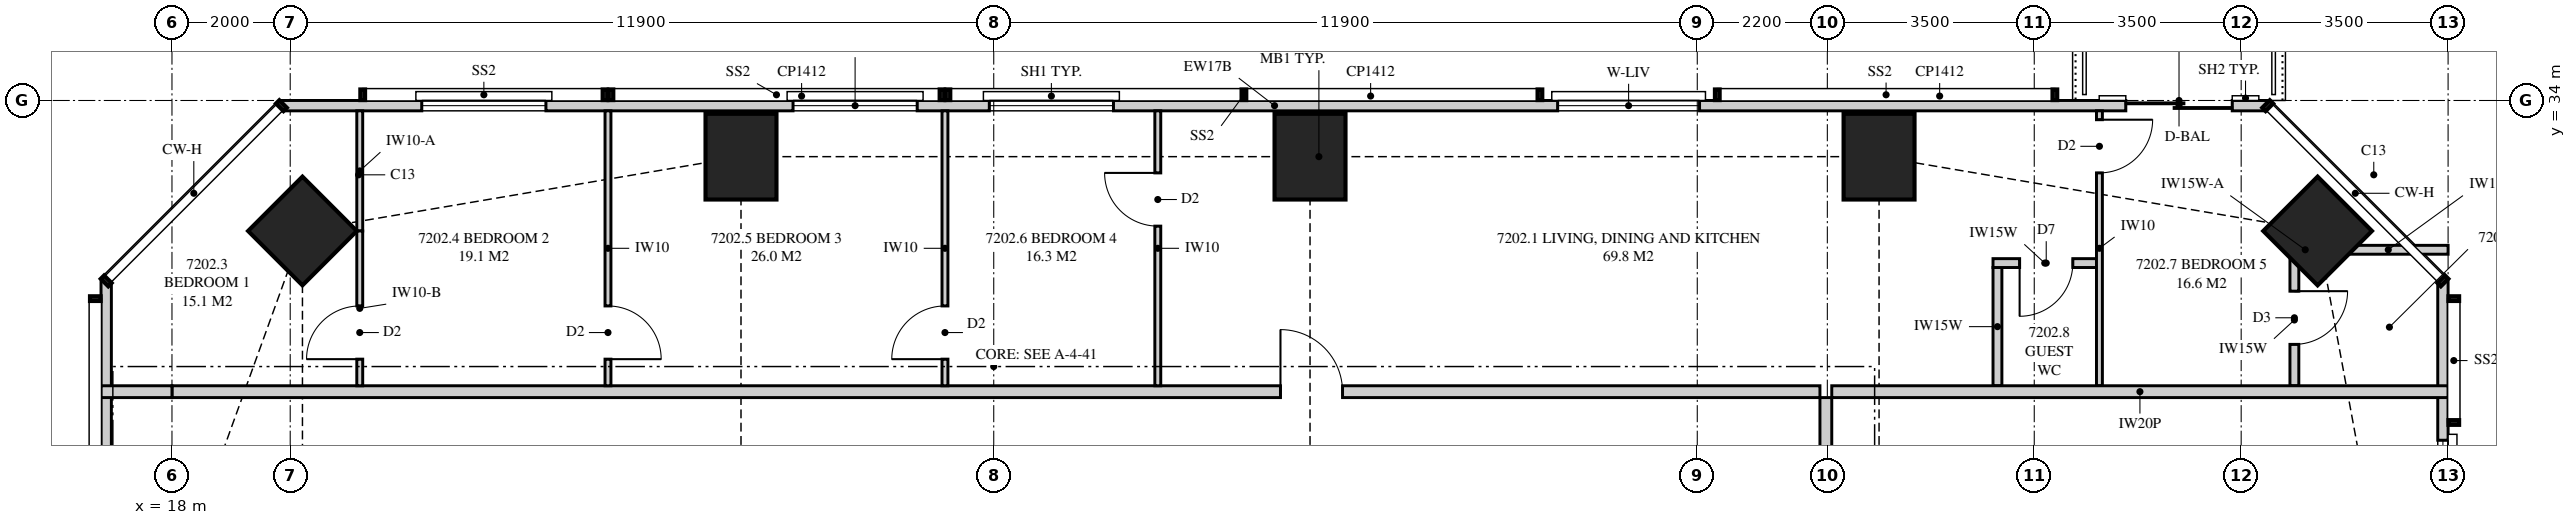
"""IFC4 building model, lengths in metres.
Left out: names, types, materials, properties, quantities, classifications, styles, units other than length and angle.
Written with IfcOpenShell. Run it as: python <this file> out.ifc"""

import sys

from ifc_helpers import new_model, si_unit, direction, frame, frame_2d, origin, origin_2d, place, context, subcontext, project, spatial, polyline, rectangle, outline, extrude, element, fill, save


model = new_model("IFC4")
c1 = context("Model", 3, precision=1e-05, world=origin(), true_north=direction((0.0, 1.0)))
c2 = subcontext(c1, "Body", "Model", "MODEL_VIEW")
j1 = project(units=[si_unit("LENGTHUNIT", "METRE"), si_unit("PLANEANGLEUNIT", "RADIAN")], contexts=[c1])
p1 = place(None, origin())
s1 = spatial("IfcSite", under=j1, at=p1, CompositionType="ELEMENT")
p2 = place(p1, origin())
s2 = spatial("IfcBuilding", under=s1, at=p2, CompositionType="ELEMENT")
p3 = place(p2, frame((0.0, 0.0, 263.85)))
s3 = spatial("IfcBuildingStorey", under=s2, at=p3, CompositionType="ELEMENT", Elevation=263.85)
p4 = place(p3, frame((54.293, 31.793, 0.0), z_axis=(0.0, 0.0, 1.0), x_axis=(0.707106781187, 0.707106781187, 0.0)))
e1 = element("IfcColumn", 1, at=p4, inside=s3, PredefinedType="COLUMN", context=c2, shape_type="SweptSolid", body=[
    extrude(rectangle(XDim=1.3, YDim=1.3, at=origin_2d()), origin(), (0.0, 0.0, 1.0), 3.9),
])
for number, where, z_axis, x_axis in (
    (2, (46.875, 33.05, 0.0), (0.0, 0.0, 1.0), (0.0, 1.0, 0.0)),
    (3, (37.25, 33.05, 0.0), (0.0, 0.0, 1.0), (0.0, 1.0, 0.0)),
    (4, (27.625, 33.05, 0.0), (0.0, 0.0, 1.0), (0.0, 1.0, 0.0)),
):
    element("IfcColumn", number, at=place(p3, frame(where, z_axis=z_axis, x_axis=x_axis)), inside=s3, PredefinedType="COLUMN", context=c2, shape_type="SweptSolid", body=[
        extrude(rectangle(XDim=1.45, YDim=1.2, at=origin_2d()), origin(), (0.0, 0.0, 1.0), 3.9),
    ])
p5 = place(p3, frame((20.207, 31.793, 0.0), z_axis=(0.0, 0.0, 1.0), x_axis=(0.707106781187, 0.707106781187, 0.0)))
e5 = element("IfcColumn", 5, at=p5, inside=s3, PredefinedType="COLUMN", context=c2, shape_type="SweptSolid", body=[
    extrude(rectangle(XDim=1.3, YDim=1.3, at=origin_2d()), origin(), (0.0, 0.0, 1.0), 3.9),
])
p6 = place(p3, frame((56.413, 24.125, 0.0), z_axis=(0.0, 0.0, 1.0), x_axis=(0.0, 1.0, 0.0)))
e6 = element("IfcWall", 6, at=p6, inside=s3, PredefinedType="SOLIDWALL", context=c2, shape_type="SweptSolid", body=[
    extrude(outline(polyline([(0.0, 0.0), (6.824, 0.0), (6.824, 3.62), (1.083, 3.62), (1.083, 2.7), (1.018, 2.7), (1.018, 3.62), (0.875, 3.62), (0.875, 2.7), (0.0, 2.7), (0.0, 0.0)])), frame((0.0, 0.087, 0.0), z_axis=(0.0, -1.0, 0.0), x_axis=(1.0, 0.0, 0.0)), (0.0, 0.0, 1.0), 0.175),
])
p7 = place(p6, frame((1.729, 0.0, 0.4)))
e7 = element("IfcOpeningElement", 7, at=p7, cuts=e6, PredefinedType="OPENING", context=c2, shape_type="SweptSolid", body=[
    extrude(rectangle(XDim=2.4, YDim=2.0, at=frame_2d((1.2, 1.0))), frame((0.0, 0.097, 0.0), z_axis=(0.0, -1.0, 0.0), x_axis=(1.0, 0.0, 0.0)), (0.0, 0.0, 1.0), 0.195),
])
p8 = place(p3, frame((53.449, 33.913, 0.0), z_axis=(0.0, 0.0, 1.0), x_axis=(-1.0, 0.0, 0.0)))
e8 = element("IfcWall", 8, at=p8, inside=s3, PredefinedType="SOLIDWALL", context=c2, shape_type="SweptSolid", body=[
    extrude(outline(polyline([(0.0, 0.0), (33.597, 0.0), (33.597, 3.62), (26.039, 3.62), (26.039, 2.7), (25.955, 2.7), (25.955, 3.62), (25.824, 3.62), (25.824, 2.7), (6.574, 2.7), (6.574, 3.62), (6.442, 3.62), (6.442, 2.7), (6.359, 2.7), (6.359, 3.62), (0.0, 3.62), (0.0, 0.0)])), frame((0.0, 0.087, 0.0), z_axis=(0.0, -1.0, 0.0), x_axis=(1.0, 0.0, 0.0)), (0.0, 0.0, 1.0), 0.175),
])
p9 = place(p8, frame((0.6, 0.0, 0.0)))
e9 = element("IfcOpeningElement", 9, at=p9, cuts=e8, PredefinedType="OPENING", context=c2, shape_type="SweptSolid", body=[
    extrude(rectangle(XDim=1.8, YDim=2.4, at=frame_2d((0.9, 1.2))), frame((0.0, 0.097, 0.0), z_axis=(0.0, -1.0, 0.0), x_axis=(1.0, 0.0, 0.0)), (0.0, 0.0, 1.0), 0.195),
])
p10 = place(p8, frame((9.61, 0.0, 0.4)))
e10 = element("IfcOpeningElement", 10, at=p10, cuts=e8, PredefinedType="OPENING", context=c2, shape_type="SweptSolid", body=[
    extrude(rectangle(XDim=2.4, YDim=2.0, at=frame_2d((1.2, 1.0))), frame((0.0, 0.097, 0.0), z_axis=(0.0, -1.0, 0.0), x_axis=(1.0, 0.0, 0.0)), (0.0, 0.0, 1.0), 0.195),
])
p11 = place(p8, frame((19.524, 0.0, 0.4)))
e11 = element("IfcOpeningElement", 11, at=p11, cuts=e8, PredefinedType="OPENING", context=c2, shape_type="SweptSolid", body=[
    extrude(rectangle(XDim=2.1, YDim=2.25, at=frame_2d((1.05, 1.125))), frame((0.0, 0.097, 0.0), z_axis=(0.0, -1.0, 0.0), x_axis=(1.0, 0.0, 0.0)), (0.0, 0.0, 1.0), 0.195),
])
p12 = place(p8, frame((22.844, 0.0, 0.4)))
e12 = element("IfcOpeningElement", 12, at=p12, cuts=e8, PredefinedType="OPENING", context=c2, shape_type="SweptSolid", body=[
    extrude(rectangle(XDim=2.1, YDim=2.25, at=frame_2d((1.05, 1.125))), frame((0.0, 0.097, 0.0), z_axis=(0.0, -1.0, 0.0), x_axis=(1.0, 0.0, 0.0)), (0.0, 0.0, 1.0), 0.195),
])
p13 = place(p8, frame((29.123, 0.0, 0.4)))
e13 = element("IfcOpeningElement", 13, at=p13, cuts=e8, PredefinedType="OPENING", context=c2, shape_type="SweptSolid", body=[
    extrude(rectangle(XDim=2.1, YDim=2.25, at=frame_2d((1.05, 1.125))), frame((0.0, 0.097, 0.0), z_axis=(0.0, -1.0, 0.0), x_axis=(1.0, 0.0, 0.0)), (0.0, 0.0, 1.0), 0.195),
])
p14 = place(p3, frame((16.887, 30.949, 0.0), z_axis=(0.0, 0.0, 1.0), x_axis=(0.0, -1.0, 0.0)))
e14 = element("IfcWall", 14, at=p14, inside=s3, PredefinedType="SOLIDWALL", context=c2, shape_type="SweptSolid", body=[
    extrude(outline(polyline([(0.0, 0.0), (27.897, 0.0), (27.897, 3.62), (18.148, 3.62), (18.148, 2.7), (18.125, 2.7), (18.125, 3.62), (17.949, 3.62), (17.949, 2.7), (5.949, 2.7), (5.949, 3.62), (0.0, 3.62), (0.0, 0.0)])), frame((0.0, 0.087, 0.0), z_axis=(0.0, -1.0, 0.0), x_axis=(1.0, 0.0, 0.0)), (0.0, 0.0, 1.0), 0.175),
])
p15 = place(p14, frame((11.849, 0.0, 0.4)))
e15 = element("IfcOpeningElement", 15, at=p15, cuts=e14, PredefinedType="OPENING", context=c2, shape_type="SweptSolid", body=[
    extrude(rectangle(XDim=1.2, YDim=2.0, at=frame_2d((0.6, 1.0))), frame((0.0, 0.097, 0.0), z_axis=(0.0, -1.0, 0.0), x_axis=(1.0, 0.0, 0.0)), (0.0, 0.0, 1.0), 0.195),
])
p16 = place(p3, frame((18.0, 29.075, 0.0), z_axis=(0.0, 0.0, 1.0), x_axis=(1.0, 0.0, 0.0)))
e16 = element("IfcWall", 16, at=p16, inside=s3, PredefinedType="PARTITIONING", context=c2, shape_type="SweptSolid", body=[
    extrude(outline(polyline([(0.0, 0.0), (27.875, 0.0), (27.875, 3.62), (27.875, 3.02), (27.565, 3.02), (27.565, 3.62), (20.56, 3.62), (20.56, 3.02), (17.94, 3.02), (17.94, 3.62), (10.935, 3.62), (10.935, 3.02), (8.315, 3.02), (8.315, 3.62), (3.517, 3.62), (3.517, 3.02), (2.192, 3.02), (2.192, 2.7), (0.256, 2.7), (0.256, 3.62), (0.0, 3.62), (0.0, 0.0)])), frame((0.0, 0.1, 0.0), z_axis=(0.0, -1.0, 0.0), x_axis=(1.0, 0.0, 0.0)), (0.0, 0.0, 1.0), 0.2),
])
p17 = place(p16, frame((18.75, 0.0, 0.0)))
e17 = element("IfcOpeningElement", 17, at=p17, cuts=e16, PredefinedType="OPENING", context=c2, shape_type="SweptSolid", body=[
    extrude(rectangle(XDim=1.05, YDim=2.2, at=frame_2d((0.525, 1.1))), frame((0.0, 0.11, 0.0), z_axis=(0.0, -1.0, 0.0), x_axis=(1.0, 0.0, 0.0)), (0.0, 0.0, 1.0), 0.22),
])
p18 = place(p3, frame((53.975, 31.475, 0.0), z_axis=(0.0, 0.0, 1.0), x_axis=(1.0, 0.0, 0.0)))
e18 = element("IfcWall", 18, at=p18, inside=s3, PredefinedType="PLUMBINGWALL", context=c2, shape_type="SweptSolid", body=[
    extrude(rectangle(XDim=0.217, YDim=0.15, at=frame_2d((0.108, 0.0))), origin(), (0.0, 0.0, 1.0), 2.7),
])
p19 = place(p3, frame((54.476, 31.475, 0.0), z_axis=(0.0, 0.0, 1.0), x_axis=(1.0, 0.0, 0.0)))
e19 = element("IfcWall", 19, at=p19, inside=s3, PredefinedType="PLUMBINGWALL", context=c2, shape_type="SweptSolid", body=[
    extrude(outline(polyline([(0.775, 3.62), (0.775, 2.7), (0.343, 2.7), (0.0, 1.35), (0.343, 0.0), (2.024, 0.0), (2.024, 3.62), (0.775, 3.62)])), frame((0.0, 0.075, 0.0), z_axis=(0.0, -1.0, 0.0), x_axis=(1.0, 0.0, 0.0)), (0.0, 0.0, 1.0), 0.15),
])
p20 = place(p3, frame((53.9, 31.4, 0.0), z_axis=(0.0, 0.0, 1.0), x_axis=(0.0, -1.0, 0.0)))
e20 = element("IfcWall", 20, at=p20, inside=s3, PredefinedType="PLUMBINGWALL", context=c2, shape_type="SweptSolid", body=[
    extrude(outline(polyline([(0.0, 0.0), (2.225, 0.0), (2.225, 3.62), (2.225, 2.7), (0.438, 2.7), (0.0, 2.7), (0.0, 3.62), (0.0, 0.0)])), frame((0.0, 0.075, 0.0), z_axis=(0.0, -1.0, 0.0), x_axis=(1.0, 0.0, 0.0)), (0.0, 0.0, 1.0), 0.15),
])
p21 = place(p20, frame((0.625, 0.0, 0.0)))
e21 = element("IfcOpeningElement", 21, at=p21, cuts=e20, PredefinedType="OPENING", context=c2, shape_type="SweptSolid", body=[
    extrude(rectangle(XDim=0.9, YDim=2.1, at=frame_2d((0.45, 1.05))), frame((0.0, 0.085, 0.0), z_axis=(0.0, -1.0, 0.0), x_axis=(1.0, 0.0, 0.0)), (0.0, 0.0, 1.0), 0.17),
])
p22 = place(p3, frame((21.176, 33.825, 0.0), z_axis=(0.0, 0.0, 1.0), x_axis=(0.0, -1.0, 0.0)))
e22 = element("IfcWall", 22, at=p22, inside=s3, PredefinedType="PARTITIONING", context=c2, shape_type="SweptSolid", body=[
    extrude(outline(polyline([(0.0, 0.0), (2.032, 0.0), (2.032, 2.7), (0.996, 2.7), (0.996, 3.62), (0.0, 3.62), (0.0, 0.0)])), frame((0.0, 0.05, 0.0), z_axis=(0.0, -1.0, 0.0), x_axis=(1.0, 0.0, 0.0)), (0.0, 0.0, 1.0), 0.1),
])
p23 = place(p3, frame((21.176, 31.793, 0.0), z_axis=(0.0, 0.0, 1.0), x_axis=(0.0, -1.0, 0.0)))
e23 = element("IfcWall", 23, at=p23, inside=s3, PredefinedType="PARTITIONING", context=c2, shape_type="SweptSolid", body=[
    extrude(outline(polyline([(0.0, 0.0), (2.618, 0.0), (2.618, 3.02), (0.708, 3.02), (0.708, 2.7), (0.0, 2.7), (0.0, 0.0)])), frame((0.0, 0.05, 0.0), z_axis=(0.0, -1.0, 0.0), x_axis=(1.0, 0.0, 0.0)), (0.0, 0.0, 1.0), 0.1),
])
p24 = place(p23, frame((1.268, 0.0, 0.0)))
e24 = element("IfcOpeningElement", 24, at=p24, cuts=e23, PredefinedType="OPENING", context=c2, shape_type="SweptSolid", body=[
    extrude(rectangle(XDim=0.9, YDim=2.1, at=frame_2d((0.45, 1.05))), frame((0.0, 0.06, 0.0), z_axis=(0.0, -1.0, 0.0), x_axis=(1.0, 0.0, 0.0)), (0.0, 0.0, 1.0), 0.12),
])
p25 = place(p3, frame((25.375, 33.825, 0.0), z_axis=(0.0, 0.0, 1.0), x_axis=(0.0, -1.0, 0.0)))
e25 = element("IfcWall", 25, at=p25, inside=s3, PredefinedType="PARTITIONING", context=c2, shape_type="SweptSolid", body=[
    extrude(outline(polyline([(0.0, 0.0), (4.65, 0.0), (4.65, 3.62), (2.029, 3.62), (2.029, 2.7), (0.284, 2.7), (0.284, 3.62), (0.0, 3.62), (0.0, 0.0)])), frame((0.0, 0.05, 0.0), z_axis=(0.0, -1.0, 0.0), x_axis=(1.0, 0.0, 0.0)), (0.0, 0.0, 1.0), 0.1),
])
p26 = place(p25, frame((3.3, 0.0, 0.0)))
e26 = element("IfcOpeningElement", 26, at=p26, cuts=e25, PredefinedType="OPENING", context=c2, shape_type="SweptSolid", body=[
    extrude(rectangle(XDim=0.9, YDim=2.1, at=frame_2d((0.45, 1.05))), frame((0.0, 0.06, 0.0), z_axis=(0.0, -1.0, 0.0), x_axis=(1.0, 0.0, 0.0)), (0.0, 0.0, 1.0), 0.12),
])
p27 = place(p3, frame((31.075, 33.825, 0.0), z_axis=(0.0, 0.0, 1.0), x_axis=(0.0, -1.0, 0.0)))
e27 = element("IfcWall", 27, at=p27, inside=s3, PredefinedType="PARTITIONING", context=c2, shape_type="SweptSolid", body=[
    extrude(outline(polyline([(0.0, 0.0), (4.65, 0.0), (4.65, 3.62), (1.635, 3.62), (1.635, 2.7), (0.0, 2.7), (0.0, 3.62), (0.0, 0.0)])), frame((0.0, 0.05, 0.0), z_axis=(0.0, -1.0, 0.0), x_axis=(1.0, 0.0, 0.0)), (0.0, 0.0, 1.0), 0.1),
])
p28 = place(p27, frame((3.3, 0.0, 0.0)))
e28 = element("IfcOpeningElement", 28, at=p28, cuts=e27, PredefinedType="OPENING", context=c2, shape_type="SweptSolid", body=[
    extrude(rectangle(XDim=0.9, YDim=2.1, at=frame_2d((0.45, 1.05))), frame((0.0, 0.06, 0.0), z_axis=(0.0, -1.0, 0.0), x_axis=(1.0, 0.0, 0.0)), (0.0, 0.0, 1.0), 0.12),
])
p29 = place(p3, frame((34.675, 33.825, 0.0), z_axis=(0.0, 0.0, 1.0), x_axis=(0.0, -1.0, 0.0)))
e29 = element("IfcWall", 29, at=p29, inside=s3, PredefinedType="PARTITIONING", context=c2, shape_type="SweptSolid", body=[
    extrude(outline(polyline([(0.0, 0.0), (4.65, 0.0), (4.65, 3.62), (1.635, 3.62), (1.635, 2.7), (0.0, 2.7), (0.0, 3.62), (0.0, 0.0)])), frame((0.0, 0.05, 0.0), z_axis=(0.0, -1.0, 0.0), x_axis=(1.0, 0.0, 0.0)), (0.0, 0.0, 1.0), 0.1),
])
p30 = place(p29, frame((1.05, 0.0, 0.0)))
e30 = element("IfcOpeningElement", 30, at=p30, cuts=e29, PredefinedType="OPENING", context=c2, shape_type="SweptSolid", body=[
    extrude(rectangle(XDim=0.9, YDim=2.1, at=frame_2d((0.45, 1.05))), frame((0.0, 0.06, 0.0), z_axis=(0.0, -1.0, 0.0), x_axis=(1.0, 0.0, 0.0)), (0.0, 0.0, 1.0), 0.12),
])
p31 = place(p3, frame((50.603, 33.825, 0.0), z_axis=(0.0, 0.0, 1.0), x_axis=(0.0, -1.0, 0.0)))
e31 = element("IfcWall", 31, at=p31, inside=s3, PredefinedType="PARTITIONING", context=c2, shape_type="SweptSolid", body=[
    extrude(outline(polyline([(0.0, 0.0), (4.65, 0.0), (4.65, 3.62), (2.279, 3.62), (2.279, 2.7), (0.534, 2.7), (0.534, 3.62), (0.0, 3.62), (0.0, 0.0)])), frame((0.0, 0.05, 0.0), z_axis=(0.0, -1.0, 0.0), x_axis=(1.0, 0.0, 0.0)), (0.0, 0.0, 1.0), 0.1),
])
p32 = place(p31, frame((0.15, 0.0, 0.0)))
e32 = element("IfcOpeningElement", 32, at=p32, cuts=e31, PredefinedType="OPENING", context=c2, shape_type="SweptSolid", body=[
    extrude(rectangle(XDim=0.9, YDim=2.1, at=frame_2d((0.45, 1.05))), frame((0.0, 0.06, 0.0), z_axis=(0.0, -1.0, 0.0), x_axis=(1.0, 0.0, 0.0)), (0.0, 0.0, 1.0), 0.12),
])
p33 = place(p3, frame((16.8, 29.075, 0.0), z_axis=(0.0, 0.0, 1.0), x_axis=(1.0, 0.0, 0.0)))
e33 = element("IfcWall", 33, at=p33, inside=s3, PredefinedType="PARTITIONING", context=c2, shape_type="SweptSolid", body=[
    extrude(rectangle(XDim=1.2, YDim=0.2, at=frame_2d((0.6, 0.0))), origin(), (0.0, 0.0, 1.0), 3.62),
])
p34 = place(p3, frame((46.075, 29.075, 0.0), z_axis=(0.0, 0.0, 1.0), x_axis=(1.0, 0.0, 0.0)))
e34 = element("IfcWall", 34, at=p34, inside=s3, PredefinedType="PARTITIONING", context=c2, shape_type="SweptSolid", body=[
    extrude(outline(polyline([(0.0, 0.0), (10.425, 0.0), (10.425, 3.62), (9.646, 3.62), (9.646, 2.7), (7.795, 2.7), (7.795, 3.62), (2.11, 3.62), (2.11, 3.02), (0.0, 3.02), (0.0, 3.62), (0.0, 0.0)])), frame((0.0, 0.1, 0.0), z_axis=(0.0, -1.0, 0.0), x_axis=(1.0, 0.0, 0.0)), (0.0, 0.0, 1.0), 0.2),
])
p35 = place(p3, frame((45.975, 25.0, 0.0), z_axis=(0.0, 0.0, 1.0), x_axis=(0.0, 1.0, 0.0)))
e35 = element("IfcWall", 35, at=p35, inside=s3, PredefinedType="PARTITIONING", context=c2, shape_type="SweptSolid", body=[
    extrude(rectangle(XDim=3.975, YDim=0.2, at=frame_2d((1.988, 0.0))), origin(), (0.0, 0.0, 1.0), 3.02),
])
p36 = place(p3, frame((50.552, 31.25, 0.0), z_axis=(0.0, 0.0, 1.0), x_axis=(-1.0, 0.0, 0.0)))
e36 = element("IfcWall", 36, at=p36, inside=s3, PredefinedType="PLUMBINGWALL", context=c2, shape_type="SweptSolid", body=[
    extrude(rectangle(XDim=1.75, YDim=0.15, at=frame_2d((0.875, 0.0))), origin(), (0.0, 0.0, 1.0), 3.62),
])
p37 = place(p36, frame((0.4, 0.0, 0.0)))
e37 = element("IfcOpeningElement", 37, at=p37, cuts=e36, PredefinedType="OPENING", context=c2, shape_type="SweptSolid", body=[
    extrude(rectangle(XDim=0.9, YDim=2.1, at=frame_2d((0.45, 1.05))), frame((0.0, 0.085, 0.0), z_axis=(0.0, -1.0, 0.0), x_axis=(1.0, 0.0, 0.0)), (0.0, 0.0, 1.0), 0.17),
])
p38 = place(p3, frame((48.877, 29.175, 0.0), z_axis=(0.0, 0.0, 1.0), x_axis=(0.0, 1.0, 0.0)))
e38 = element("IfcWall", 38, at=p38, inside=s3, PredefinedType="PLUMBINGWALL", context=c2, shape_type="SweptSolid", body=[
    extrude(rectangle(XDim=2.0, YDim=0.15, at=frame_2d((1.0, 0.0))), origin(), (0.0, 0.0, 1.0), 3.62),
])
p39 = place(p7, origin())
e39 = element("IfcWindow", 39, at=p39, inside=s3, PartitioningType="SINGLE_PANEL", PredefinedType="WINDOW", context=c2, shape_type="SweptSolid", body=[
    extrude(rectangle(XDim=2.4, YDim=2.0, at=frame_2d((1.2, 1.0))), frame((0.0, 0.03, 0.0), z_axis=(0.0, -1.0, 0.0), x_axis=(1.0, 0.0, 0.0)), (0.0, 0.0, 1.0), 0.06),
])
fill(e7, e39)
p40 = place(p9, origin())
e40 = element("IfcDoor", 40, at=p40, inside=s3, OperationType="SLIDING_TO_LEFT", PredefinedType="DOOR", context=c2, shape_type="SweptSolid", body=[
    extrude(rectangle(XDim=1.8, YDim=2.4, at=frame_2d((0.9, 1.2))), frame((0.0, 0.025, 0.0), z_axis=(0.0, -1.0, 0.0), x_axis=(1.0, 0.0, 0.0)), (0.0, 0.0, 1.0), 0.05),
])
fill(e9, e40)
p41 = place(p10, origin())
e41 = element("IfcWindow", 41, at=p41, inside=s3, PartitioningType="SINGLE_PANEL", PredefinedType="WINDOW", context=c2, shape_type="SweptSolid", body=[
    extrude(rectangle(XDim=2.4, YDim=2.0, at=frame_2d((1.2, 1.0))), frame((0.0, 0.03, 0.0), z_axis=(0.0, -1.0, 0.0), x_axis=(1.0, 0.0, 0.0)), (0.0, 0.0, 1.0), 0.06),
])
fill(e10, e41)
p42 = place(p11, origin())
e42 = element("IfcWindow", 42, at=p42, inside=s3, PartitioningType="SINGLE_PANEL", PredefinedType="WINDOW", context=c2, shape_type="SweptSolid", body=[
    extrude(rectangle(XDim=2.1, YDim=2.25, at=frame_2d((1.05, 1.125))), frame((0.0, 0.03, 0.0), z_axis=(0.0, -1.0, 0.0), x_axis=(1.0, 0.0, 0.0)), (0.0, 0.0, 1.0), 0.06),
])
fill(e11, e42)
p43 = place(p12, origin())
e43 = element("IfcWindow", 43, at=p43, inside=s3, PartitioningType="SINGLE_PANEL", PredefinedType="WINDOW", context=c2, shape_type="SweptSolid", body=[
    extrude(rectangle(XDim=2.1, YDim=2.25, at=frame_2d((1.05, 1.125))), frame((0.0, 0.03, 0.0), z_axis=(0.0, -1.0, 0.0), x_axis=(1.0, 0.0, 0.0)), (0.0, 0.0, 1.0), 0.06),
])
fill(e12, e43)
p44 = place(p13, origin())
e44 = element("IfcWindow", 44, at=p44, inside=s3, PartitioningType="SINGLE_PANEL", PredefinedType="WINDOW", context=c2, shape_type="SweptSolid", body=[
    extrude(rectangle(XDim=2.1, YDim=2.25, at=frame_2d((1.05, 1.125))), frame((0.0, 0.03, 0.0), z_axis=(0.0, -1.0, 0.0), x_axis=(1.0, 0.0, 0.0)), (0.0, 0.0, 1.0), 0.06),
])
fill(e13, e44)
p45 = place(p17, origin())
e45 = element("IfcDoor", 45, at=p45, inside=s3, OperationType="SINGLE_SWING_LEFT", PredefinedType="DOOR", context=c2, shape_type="SweptSolid", body=[
    extrude(rectangle(XDim=1.05, YDim=2.2, at=frame_2d((0.525, 1.1))), frame((0.0, 0.025, 0.0), z_axis=(0.0, -1.0, 0.0), x_axis=(1.0, 0.0, 0.0)), (0.0, 0.0, 1.0), 0.05),
])
fill(e17, e45)
p46 = place(p21, origin())
e46 = element("IfcDoor", 46, at=p46, inside=s3, OperationType="SINGLE_SWING_LEFT", PredefinedType="DOOR", context=c2, shape_type="SweptSolid", body=[
    extrude(rectangle(XDim=0.9, YDim=2.1, at=frame_2d((0.45, 1.05))), frame((0.0, 0.025, 0.0), z_axis=(0.0, -1.0, 0.0), x_axis=(1.0, 0.0, 0.0)), (0.0, 0.0, 1.0), 0.05),
])
fill(e21, e46)
p47 = place(p24, frame((0.9, 0.0, 0.0), z_axis=(0.0, 0.0, 1.0), x_axis=(-1.0, 0.0, 0.0)))
e47 = element("IfcDoor", 47, at=p47, inside=s3, OperationType="SINGLE_SWING_LEFT", PredefinedType="DOOR", context=c2, shape_type="SweptSolid", body=[
    extrude(rectangle(XDim=0.9, YDim=2.1, at=frame_2d((0.45, 1.05))), frame((0.0, 0.025, 0.0), z_axis=(0.0, -1.0, 0.0), x_axis=(1.0, 0.0, 0.0)), (0.0, 0.0, 1.0), 0.05),
])
fill(e24, e47)
p48 = place(p26, origin())
e48 = element("IfcDoor", 48, at=p48, inside=s3, OperationType="SINGLE_SWING_RIGHT", PredefinedType="DOOR", context=c2, shape_type="SweptSolid", body=[
    extrude(rectangle(XDim=0.9, YDim=2.1, at=frame_2d((0.45, 1.05))), frame((0.0, 0.025, 0.0), z_axis=(0.0, -1.0, 0.0), x_axis=(1.0, 0.0, 0.0)), (0.0, 0.0, 1.0), 0.05),
])
fill(e26, e48)
p49 = place(p28, frame((0.9, 0.0, 0.0), z_axis=(0.0, 0.0, 1.0), x_axis=(-1.0, 0.0, 0.0)))
e49 = element("IfcDoor", 49, at=p49, inside=s3, OperationType="SINGLE_SWING_LEFT", PredefinedType="DOOR", context=c2, shape_type="SweptSolid", body=[
    extrude(rectangle(XDim=0.9, YDim=2.1, at=frame_2d((0.45, 1.05))), frame((0.0, 0.025, 0.0), z_axis=(0.0, -1.0, 0.0), x_axis=(1.0, 0.0, 0.0)), (0.0, 0.0, 1.0), 0.05),
])
fill(e28, e49)
p50 = place(p30, frame((0.9, 0.0, 0.0), z_axis=(0.0, 0.0, 1.0), x_axis=(-1.0, 0.0, 0.0)))
e50 = element("IfcDoor", 50, at=p50, inside=s3, OperationType="SINGLE_SWING_RIGHT", PredefinedType="DOOR", context=c2, shape_type="SweptSolid", body=[
    extrude(rectangle(XDim=0.9, YDim=2.1, at=frame_2d((0.45, 1.05))), frame((0.0, 0.025, 0.0), z_axis=(0.0, -1.0, 0.0), x_axis=(1.0, 0.0, 0.0)), (0.0, 0.0, 1.0), 0.05),
])
fill(e30, e50)
p51 = place(p32, origin())
e51 = element("IfcDoor", 51, at=p51, inside=s3, OperationType="SINGLE_SWING_LEFT", PredefinedType="DOOR", context=c2, shape_type="SweptSolid", body=[
    extrude(rectangle(XDim=0.9, YDim=2.1, at=frame_2d((0.45, 1.05))), frame((0.0, 0.025, 0.0), z_axis=(0.0, -1.0, 0.0), x_axis=(1.0, 0.0, 0.0)), (0.0, 0.0, 1.0), 0.05),
])
fill(e32, e51)
p52 = place(p37, origin())
e52 = element("IfcDoor", 52, at=p52, inside=s3, OperationType="SINGLE_SWING_RIGHT", PredefinedType="DOOR", context=c2, shape_type="SweptSolid", body=[
    extrude(rectangle(XDim=0.9, YDim=2.1, at=frame_2d((0.45, 1.05))), frame((0.0, 0.025, 0.0), z_axis=(0.0, -1.0, 0.0), x_axis=(1.0, 0.0, 0.0)), (0.0, 0.0, 1.0), 0.05),
])
fill(e37, e52)
save(model, sys.argv[1])
